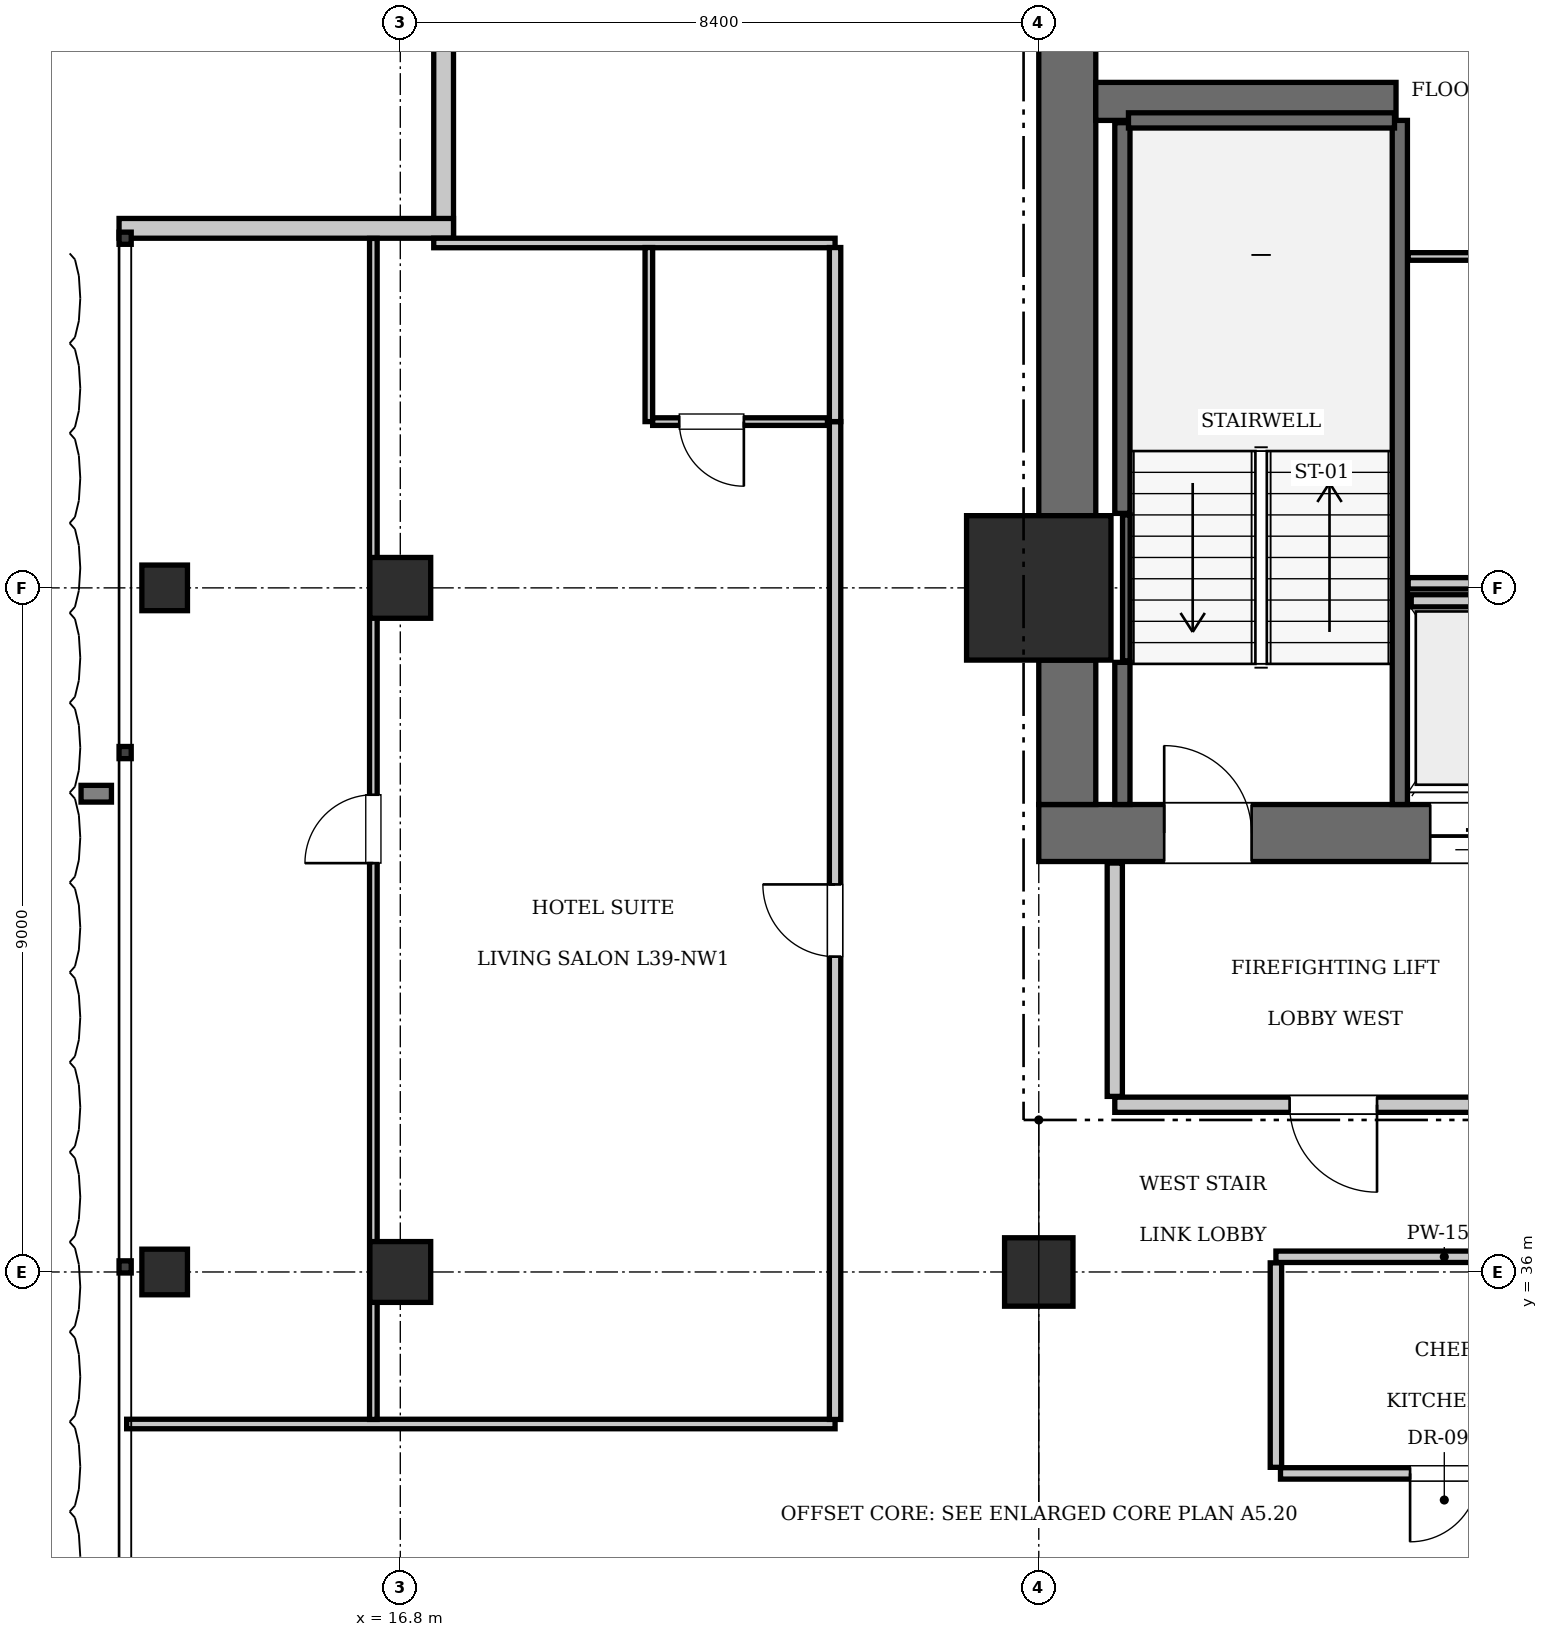
"""IFC4 building model, lengths in metres.
Left out: names, types, materials, properties, quantities, classifications, styles, units other than length and angle.
Written with IfcOpenShell. Run it as: python <this file> out.ifc"""

import sys

from ifc_helpers import new_model, si_unit, direction, frame, frame_2d, origin, origin_2d, place, context, subcontext, project, spatial, rectangle, i_section, extrude, element, fill, save


model = new_model("IFC4")
c1 = context("Model", 3, precision=1e-05, world=origin(), true_north=direction((0.0, 1.0)))
c2 = subcontext(c1, "Body", "Model", "MODEL_VIEW")
j1 = project(units=[si_unit("LENGTHUNIT", "METRE"), si_unit("PLANEANGLEUNIT", "RADIAN")], contexts=[c1])
p1 = place(None, origin())
s1 = spatial("IfcSite", under=j1, at=p1, CompositionType="ELEMENT")
p2 = place(p1, origin())
s2 = spatial("IfcBuilding", under=s1, at=p2, CompositionType="ELEMENT")
p3 = place(p2, frame((0.0, 0.0, 162.05)))
s3 = spatial("IfcBuildingStorey", under=s2, at=p3, CompositionType="ELEMENT", Elevation=162.05)
p4 = place(p3, frame((25.2, 45.0, 0.0), z_axis=(0.0, 0.0, 1.0), x_axis=(1.0, 0.0, 0.0)))
e1 = element("IfcColumn", 1, at=p4, inside=s3, PredefinedType="COLUMN", context=c2, shape_type="SweptSolid", body=[
    extrude(rectangle(XDim=1.9, YDim=1.9, at=origin_2d()), origin(), (0.0, 0.0, 1.0), 3.85),
])
p5 = place(p3, frame((25.2, 41.775, 0.0), z_axis=(0.0, 0.0, 1.0), x_axis=(1.0, 0.0, 0.0)))
e2 = element("IfcWall", 2, at=p5, inside=s3, PredefinedType="SHEAR", context=c2, shape_type="SweptSolid", body=[
    extrude(rectangle(XDim=6.8, YDim=0.75, at=frame_2d((3.4, 0.0))), origin(), (0.0, 0.0, 1.0), 3.85),
])
p6 = place(p5, frame((1.65, 0.0, 0.0)))
e3 = element("IfcOpeningElement", 3, at=p6, cuts=e2, PredefinedType="OPENING", context=c2, shape_type="SweptSolid", body=[
    extrude(rectangle(XDim=1.15, YDim=2.15, at=frame_2d((0.575, 1.075))), frame((0.0, 0.385, 0.0), z_axis=(0.0, -1.0, 0.0), x_axis=(1.0, 0.0, 0.0)), (0.0, 0.0, 1.0), 0.77),
])
p7 = place(p5, frame((5.15, 0.0, 0.0)))
e4 = element("IfcOpeningElement", 4, at=p7, cuts=e2, PredefinedType="OPENING", context=c2, shape_type="SweptSolid", body=[
    extrude(rectangle(XDim=1.1, YDim=2.2, at=frame_2d((0.55, 1.1))), frame((0.0, 0.385, 0.0), z_axis=(0.0, -1.0, 0.0), x_axis=(1.0, 0.0, 0.0)), (0.0, 0.0, 1.0), 0.77),
])
p8 = place(p3, frame((25.575, 42.15, 0.0), z_axis=(0.0, 0.0, 1.0), x_axis=(0.0, 1.0, 0.0)))
e5 = element("IfcWall", 5, at=p8, inside=s3, PredefinedType="SHEAR", context=c2, shape_type="SweptSolid", body=[
    extrude(rectangle(XDim=1.9, YDim=0.75, at=frame_2d((0.95, 0.0))), origin(), (0.0, 0.0, 1.0), 3.85),
])
p9 = place(p3, frame((25.575, 45.95, 0.0), z_axis=(0.0, 0.0, 1.0), x_axis=(0.0, 1.0, 0.0)))
e6 = element("IfcWall", 6, at=p9, inside=s3, PredefinedType="SHEAR", context=c2, shape_type="SweptSolid", body=[
    extrude(rectangle(XDim=7.3, YDim=0.75, at=frame_2d((3.65, 0.0))), origin(), (0.0, 0.0, 1.0), 3.85),
])
p10 = place(p3, frame((25.95, 51.4, 0.0), z_axis=(0.0, 0.0, 1.0), x_axis=(1.0, 0.0, 0.0)))
e7 = element("IfcWall", 7, at=p10, inside=s3, PredefinedType="SHEAR", context=c2, shape_type="SweptSolid", body=[
    extrude(rectangle(XDim=3.95, YDim=0.5, at=frame_2d((1.975, 0.0))), origin(), (0.0, 0.0, 1.0), 3.85),
])
p11 = place(p3, frame((25.2, 36.0, 0.0), z_axis=(0.0, 0.0, 1.0), x_axis=(1.0, 0.0, 0.0)))
e8 = element("IfcColumn", 8, at=p11, inside=s3, PredefinedType="COLUMN", context=c2, shape_type="SweptSolid", body=[
    extrude(rectangle(XDim=0.9, YDim=0.9, at=origin_2d()), origin(), (0.0, 0.0, 1.0), 3.85),
])
for number, where, z_axis, x_axis in (
    (9, (16.8, 36.0, 0.0), (0.0, 0.0, 1.0), (1.0, 0.0, 0.0)),
    (10, (16.8, 45.0, 0.0), (0.0, 0.0, 1.0), (1.0, 0.0, 0.0)),
):
    element("IfcColumn", number, at=place(p3, frame(where, z_axis=z_axis, x_axis=x_axis)), inside=s3, PredefinedType="COLUMN", context=c2, shape_type="SweptSolid", body=[
        extrude(rectangle(XDim=0.8, YDim=0.8, at=origin_2d()), origin(), (0.0, 0.0, 1.0), 3.85),
    ])
for number, where, z_axis, x_axis in (
    (11, (13.7, 36.0, 0.0), (0.0, 0.0, 1.0), (1.0, 0.0, 0.0)),
    (12, (13.7, 45.0, 0.0), (0.0, 0.0, 1.0), (1.0, 0.0, 0.0)),
):
    element("IfcColumn", number, at=place(p3, frame(where, z_axis=z_axis, x_axis=x_axis)), inside=s3, PredefinedType="COLUMN", context=c2, shape_type="SweptSolid", body=[
        extrude(i_section(OverallWidth=0.6, OverallDepth=0.6, WebThickness=0.025, FlangeThickness=0.038, at=origin_2d()), origin(), (0.0, 0.0, 1.0), 3.85),
    ])
p12 = place(p3, frame((29.95, 42.15, 0.0), z_axis=(0.0, 0.0, 1.0), x_axis=(0.0, 1.0, 0.0)))
e13 = element("IfcWall", 13, at=p12, inside=s3, PredefinedType="SOLIDWALL", context=c2, shape_type="SweptSolid", body=[
    extrude(rectangle(XDim=9.0, YDim=0.2, at=frame_2d((4.5, 0.0))), origin(), (0.0, 0.0, 1.0), 3.61),
])
p13 = place(p3, frame((26.3, 42.15, 0.0), z_axis=(0.0, 0.0, 1.0), x_axis=(0.0, 1.0, 0.0)))
e14 = element("IfcWall", 14, at=p13, inside=s3, PredefinedType="SOLIDWALL", context=c2, shape_type="SweptSolid", body=[
    extrude(rectangle(XDim=1.87, YDim=0.2, at=frame_2d((0.935, 0.0))), origin(), (0.0, 0.0, 1.0), 3.61),
])
p14 = place(p3, frame((26.3, 45.98, 0.0), z_axis=(0.0, 0.0, 1.0), x_axis=(0.0, 1.0, 0.0)))
e15 = element("IfcWall", 15, at=p14, inside=s3, PredefinedType="SOLIDWALL", context=c2, shape_type="SweptSolid", body=[
    extrude(rectangle(XDim=5.14, YDim=0.2, at=frame_2d((2.57, 0.0))), origin(), (0.0, 0.0, 1.0), 3.61),
])
p15 = place(p3, frame((26.38, 51.15, 0.0), z_axis=(0.0, 0.0, 1.0), x_axis=(1.0, 0.0, 0.0)))
e16 = element("IfcWall", 16, at=p15, inside=s3, PredefinedType="SOLIDWALL", context=c2, shape_type="SweptSolid", body=[
    extrude(rectangle(XDim=3.5, YDim=0.2, at=frame_2d((1.75, 0.0))), origin(), (0.0, 0.0, 1.0), 3.61),
])
p16 = place(p3, frame((26.352, 44.04, 0.0), z_axis=(0.0, 0.0, 1.0), x_axis=(0.0, 1.0, 0.0)))
e17 = element("IfcWall", 17, at=p16, inside=s3, PredefinedType="SOLIDWALL", context=c2, shape_type="SweptSolid", body=[
    extrude(rectangle(XDim=1.92, YDim=0.1, at=frame_2d((0.96, 0.0))), origin(), (0.0, 0.0, 1.0), 3.61),
])
p17 = place(p3, frame((30.1, 44.83, 0.0), z_axis=(0.0, 0.0, 1.0), x_axis=(1.0, 0.0, 0.0)))
e18 = element("IfcWall", 18, at=p17, inside=s3, PredefinedType="SOLIDWALL", context=c2, shape_type="SweptSolid", body=[
    extrude(rectangle(XDim=1.6, YDim=0.16, at=frame_2d((0.8, 0.0))), origin(), (0.0, 0.0, 1.0), 3.61),
])
for number, where, z_axis, x_axis in (
    (19, (17.37, 49.6, 0.0), (0.0, 0.0, 1.0), (0.0, 1.0, 0.0)),
    (20, (13.1, 49.73, 0.0), (0.0, 0.0, 1.0), (1.0, 0.0, 0.0)),
):
    element("IfcWall", number, at=place(p3, frame(where, z_axis=z_axis, x_axis=x_axis)), inside=s3, PredefinedType="SOLIDWALL", context=c2, shape_type="SweptSolid", body=[
        extrude(rectangle(XDim=4.4, YDim=0.26, at=frame_2d((2.2, 0.0))), origin(), (0.0, 0.0, 1.0), 3.61),
    ])
p18 = place(p3, frame((26.2, 38.2, 0.0), z_axis=(0.0, 0.0, 1.0), x_axis=(1.0, 0.0, 0.0)))
e21 = element("IfcWall", 21, at=p18, inside=s3, PredefinedType="PARTITIONING", context=c2, shape_type="SweptSolid", body=[
    extrude(rectangle(XDim=5.8, YDim=0.2, at=frame_2d((2.9, 0.0))), origin(), (0.0, 0.0, 1.0), 3.61),
])
p19 = place(p18, frame((2.3, 0.0, 0.0)))
e22 = element("IfcOpeningElement", 22, at=p19, cuts=e21, PredefinedType="OPENING", context=c2, shape_type="SweptSolid", body=[
    extrude(rectangle(XDim=1.15, YDim=2.15, at=frame_2d((0.575, 1.075))), frame((0.0, 0.11, 0.0), z_axis=(0.0, -1.0, 0.0), x_axis=(1.0, 0.0, 0.0)), (0.0, 0.0, 1.0), 0.22),
])
p20 = place(p3, frame((26.2, 38.31, 0.0), z_axis=(0.0, 0.0, 1.0), x_axis=(0.0, 1.0, 0.0)))
e23 = element("IfcWall", 23, at=p20, inside=s3, PredefinedType="PARTITIONING", context=c2, shape_type="SweptSolid", body=[
    extrude(rectangle(XDim=3.07, YDim=0.2, at=frame_2d((1.535, 0.0))), origin(), (0.0, 0.0, 1.0), 3.61),
])
p21 = place(p3, frame((30.06, 45.06, 0.0), z_axis=(0.0, 0.0, 1.0), x_axis=(1.0, 0.0, 0.0)))
e24 = element("IfcWall", 24, at=p21, inside=s3, PredefinedType="PARTITIONING", context=c2, shape_type="SweptSolid", body=[
    extrude(rectangle(XDim=3.18, YDim=0.15, at=frame_2d((1.59, 0.0))), origin(), (0.0, 0.0, 1.0), 3.61),
])
p22 = place(p3, frame((30.06, 49.36, 0.0), z_axis=(0.0, 0.0, 1.0), x_axis=(1.0, 0.0, 0.0)))
e25 = element("IfcWall", 25, at=p22, inside=s3, PredefinedType="PARTITIONING", context=c2, shape_type="SweptSolid", body=[
    extrude(rectangle(XDim=3.18, YDim=0.1, at=frame_2d((1.59, 0.0))), origin(), (0.0, 0.0, 1.0), 3.61),
])
p23 = place(p22, frame((1.95, 0.0, 0.0)))
e26 = element("IfcOpeningElement", 26, at=p23, cuts=e25, PredefinedType="OPENING", context=c2, shape_type="SweptSolid", body=[
    extrude(rectangle(XDim=0.8, YDim=2.05, at=frame_2d((0.4, 1.025))), frame((0.0, 0.06, 0.0), z_axis=(0.0, -1.0, 0.0), x_axis=(1.0, 0.0, 0.0)), (0.0, 0.0, 1.0), 0.12),
])
p24 = place(p3, frame((28.32, 36.2, 0.0), z_axis=(0.0, 0.0, 1.0), x_axis=(1.0, 0.0, 0.0)))
e27 = element("IfcWall", 27, at=p24, inside=s3, PredefinedType="PARTITIONING", context=c2, shape_type="SweptSolid", body=[
    extrude(rectangle(XDim=4.43, YDim=0.15, at=frame_2d((2.215, 0.0))), origin(), (0.0, 0.0, 1.0), 3.61),
])
p25 = place(p3, frame((28.32, 33.43, 0.0), z_axis=(0.0, 0.0, 1.0), x_axis=(0.0, 1.0, 0.0)))
e28 = element("IfcWall", 28, at=p25, inside=s3, PredefinedType="PARTITIONING", context=c2, shape_type="SweptSolid", body=[
    extrude(rectangle(XDim=2.69, YDim=0.15, at=frame_2d((1.345, 0.0))), origin(), (0.0, 0.0, 1.0), 3.61),
])
p26 = place(p3, frame((28.38, 33.35, 0.0), z_axis=(0.0, 0.0, 1.0), x_axis=(1.0, 0.0, 0.0)))
e29 = element("IfcWall", 29, at=p26, inside=s3, PredefinedType="PARTITIONING", context=c2, shape_type="SweptSolid", body=[
    extrude(rectangle(XDim=4.31, YDim=0.15, at=frame_2d((2.155, 0.0))), origin(), (0.0, 0.0, 1.0), 3.61),
])
p27 = place(p26, frame((1.705, 0.0, 0.0)))
e30 = element("IfcOpeningElement", 30, at=p27, cuts=e29, PredefinedType="OPENING", context=c2, shape_type="SweptSolid", body=[
    extrude(rectangle(XDim=0.9, YDim=2.1, at=frame_2d((0.45, 1.05))), frame((0.0, 0.085, 0.0), z_axis=(0.0, -1.0, 0.0), x_axis=(1.0, 0.0, 0.0)), (0.0, 0.0, 1.0), 0.17),
])
p28 = place(p3, frame((13.2, 34.0, 0.0), z_axis=(0.0, 0.0, 1.0), x_axis=(1.0, 0.0, 0.0)))
e31 = element("IfcWall", 31, at=p28, inside=s3, PredefinedType="PARTITIONING", context=c2, shape_type="SweptSolid", body=[
    extrude(rectangle(XDim=9.32, YDim=0.125, at=frame_2d((4.66, 0.0))), origin(), (0.0, 0.0, 1.0), 3.61),
])
p29 = place(p3, frame((17.24, 49.538, 0.0), z_axis=(0.0, 0.0, 1.0), x_axis=(1.0, 0.0, 0.0)))
e32 = element("IfcWall", 32, at=p29, inside=s3, PredefinedType="PARTITIONING", context=c2, shape_type="SweptSolid", body=[
    extrude(rectangle(XDim=5.28, YDim=0.125, at=frame_2d((2.64, 0.0))), origin(), (0.0, 0.0, 1.0), 3.61),
])
p30 = place(p3, frame((22.52, 34.06, 0.0), z_axis=(0.0, 0.0, 1.0), x_axis=(0.0, 1.0, 0.0)))
e33 = element("IfcWall", 33, at=p30, inside=s3, PredefinedType="PARTITIONING", context=c2, shape_type="SweptSolid", body=[
    extrude(rectangle(XDim=13.127, YDim=0.15, at=frame_2d((6.564, 0.0))), origin(), (0.0, 0.0, 1.0), 3.61),
])
p31 = place(p30, frame((6.089, 0.0, 0.0)))
e34 = element("IfcOpeningElement", 34, at=p31, cuts=e33, PredefinedType="OPENING", context=c2, shape_type="SweptSolid", body=[
    extrude(rectangle(XDim=0.95, YDim=2.15, at=frame_2d((0.475, 1.075))), frame((0.0, 0.085, 0.0), z_axis=(0.0, -1.0, 0.0), x_axis=(1.0, 0.0, 0.0)), (0.0, 0.0, 1.0), 0.17),
])
p32 = place(p3, frame((22.52, 47.188, 0.0), z_axis=(0.0, 0.0, 1.0), x_axis=(0.0, 1.0, 0.0)))
e35 = element("IfcWall", 35, at=p32, inside=s3, PredefinedType="PARTITIONING", context=c2, shape_type="SweptSolid", body=[
    extrude(rectangle(XDim=2.29, YDim=0.15, at=frame_2d((1.145, 0.0))), origin(), (0.0, 0.0, 1.0), 3.61),
])
p33 = place(p3, frame((20.07, 47.188, 0.0), z_axis=(0.0, 0.0, 1.0), x_axis=(0.0, 1.0, 0.0)))
e36 = element("IfcWall", 36, at=p33, inside=s3, PredefinedType="PARTITIONING", context=c2, shape_type="SweptSolid", body=[
    extrude(rectangle(XDim=2.29, YDim=0.1, at=frame_2d((1.145, 0.0))), origin(), (0.0, 0.0, 1.0), 3.61),
])
p34 = place(p3, frame((20.12, 47.188, 0.0), z_axis=(0.0, 0.0, 1.0), x_axis=(1.0, 0.0, 0.0)))
e37 = element("IfcWall", 37, at=p34, inside=s3, PredefinedType="PARTITIONING", context=c2, shape_type="SweptSolid", body=[
    extrude(rectangle(XDim=2.3, YDim=0.1, at=frame_2d((1.15, 0.0))), origin(), (0.0, 0.0, 1.0), 3.61),
])
p35 = place(p34, frame((0.35, 0.0, 0.0)))
e38 = element("IfcOpeningElement", 38, at=p35, cuts=e37, PredefinedType="OPENING", context=c2, shape_type="SweptSolid", body=[
    extrude(rectangle(XDim=0.85, YDim=2.1, at=frame_2d((0.425, 1.05))), frame((0.0, 0.06, 0.0), z_axis=(0.0, -1.0, 0.0), x_axis=(1.0, 0.0, 0.0)), (0.0, 0.0, 1.0), 0.12),
])
p36 = place(p3, frame((16.446, 34.06, 0.0), z_axis=(0.0, 0.0, 1.0), x_axis=(0.0, 1.0, 0.0)))
e39 = element("IfcWall", 39, at=p36, inside=s3, PredefinedType="PARTITIONING", context=c2, shape_type="SweptSolid", body=[
    extrude(rectangle(XDim=15.537, YDim=0.1, at=frame_2d((7.769, 0.0))), origin(), (0.0, 0.0, 1.0), 3.61),
])
p37 = place(p36, frame((7.319, 0.0, 0.0)))
e40 = element("IfcOpeningElement", 40, at=p37, cuts=e39, PredefinedType="OPENING", context=c2, shape_type="SweptSolid", body=[
    extrude(rectangle(XDim=0.9, YDim=2.1, at=frame_2d((0.45, 1.05))), frame((0.0, 0.06, 0.0), z_axis=(0.0, -1.0, 0.0), x_axis=(1.0, 0.0, 0.0)), (0.0, 0.0, 1.0), 0.12),
])
p38 = place(p6, origin())
e41 = element("IfcDoor", 41, at=p38, inside=s3, OperationType="SINGLE_SWING_LEFT", PredefinedType="DOOR", context=c2, shape_type="SweptSolid", body=[
    extrude(rectangle(XDim=1.15, YDim=2.15, at=frame_2d((0.575, 1.075))), frame((0.0, 0.025, 0.0), z_axis=(0.0, -1.0, 0.0), x_axis=(1.0, 0.0, 0.0)), (0.0, 0.0, 1.0), 0.05),
])
fill(e3, e41)
p39 = place(p7, frame((1.1, 0.0, 0.0), z_axis=(0.0, 0.0, 1.0), x_axis=(-1.0, 0.0, 0.0)))
e42 = element("IfcDoor", 42, at=p39, inside=s3, OperationType="SLIDING_TO_LEFT", PredefinedType="DOOR", context=c2, shape_type="SweptSolid", body=[
    extrude(rectangle(XDim=1.1, YDim=2.2, at=frame_2d((0.55, 1.1))), frame((0.0, 0.025, 0.0), z_axis=(0.0, -1.0, 0.0), x_axis=(1.0, 0.0, 0.0)), (0.0, 0.0, 1.0), 0.05),
])
fill(e4, e42)
p40 = place(p19, frame((1.15, 0.0, 0.0), z_axis=(0.0, 0.0, 1.0), x_axis=(-1.0, 0.0, 0.0)))
e43 = element("IfcDoor", 43, at=p40, inside=s3, OperationType="SINGLE_SWING_LEFT", PredefinedType="DOOR", context=c2, shape_type="SweptSolid", body=[
    extrude(rectangle(XDim=1.15, YDim=2.15, at=frame_2d((0.575, 1.075))), frame((0.0, 0.025, 0.0), z_axis=(0.0, -1.0, 0.0), x_axis=(1.0, 0.0, 0.0)), (0.0, 0.0, 1.0), 0.05),
])
fill(e22, e43)
p41 = place(p27, frame((0.9, 0.0, 0.0), z_axis=(0.0, 0.0, 1.0), x_axis=(-1.0, 0.0, 0.0)))
e44 = element("IfcDoor", 44, at=p41, inside=s3, OperationType="SINGLE_SWING_RIGHT", PredefinedType="DOOR", context=c2, shape_type="SweptSolid", body=[
    extrude(rectangle(XDim=0.9, YDim=2.1, at=frame_2d((0.45, 1.05))), frame((0.0, 0.025, 0.0), z_axis=(0.0, -1.0, 0.0), x_axis=(1.0, 0.0, 0.0)), (0.0, 0.0, 1.0), 0.05),
])
fill(e30, e44)
p42 = place(p35, frame((0.85, 0.0, 0.0), z_axis=(0.0, 0.0, 1.0), x_axis=(-1.0, 0.0, 0.0)))
e45 = element("IfcDoor", 45, at=p42, inside=s3, OperationType="SINGLE_SWING_LEFT", PredefinedType="DOOR", context=c2, shape_type="SweptSolid", body=[
    extrude(rectangle(XDim=0.85, YDim=2.1, at=frame_2d((0.425, 1.05))), frame((0.0, 0.025, 0.0), z_axis=(0.0, -1.0, 0.0), x_axis=(1.0, 0.0, 0.0)), (0.0, 0.0, 1.0), 0.05),
])
fill(e38, e45)
p43 = place(p31, origin())
e46 = element("IfcDoor", 46, at=p43, inside=s3, OperationType="SINGLE_SWING_RIGHT", PredefinedType="DOOR", context=c2, shape_type="SweptSolid", body=[
    extrude(rectangle(XDim=0.95, YDim=2.15, at=frame_2d((0.475, 1.075))), frame((0.0, 0.025, 0.0), z_axis=(0.0, -1.0, 0.0), x_axis=(1.0, 0.0, 0.0)), (0.0, 0.0, 1.0), 0.05),
])
fill(e34, e46)
p44 = place(p37, origin())
e47 = element("IfcDoor", 47, at=p44, inside=s3, OperationType="SINGLE_SWING_LEFT", PredefinedType="DOOR", context=c2, shape_type="SweptSolid", body=[
    extrude(rectangle(XDim=0.9, YDim=2.1, at=frame_2d((0.45, 1.05))), frame((0.0, 0.025, 0.0), z_axis=(0.0, -1.0, 0.0), x_axis=(1.0, 0.0, 0.0)), (0.0, 0.0, 1.0), 0.05),
])
fill(e40, e47)
save(model, sys.argv[1])
